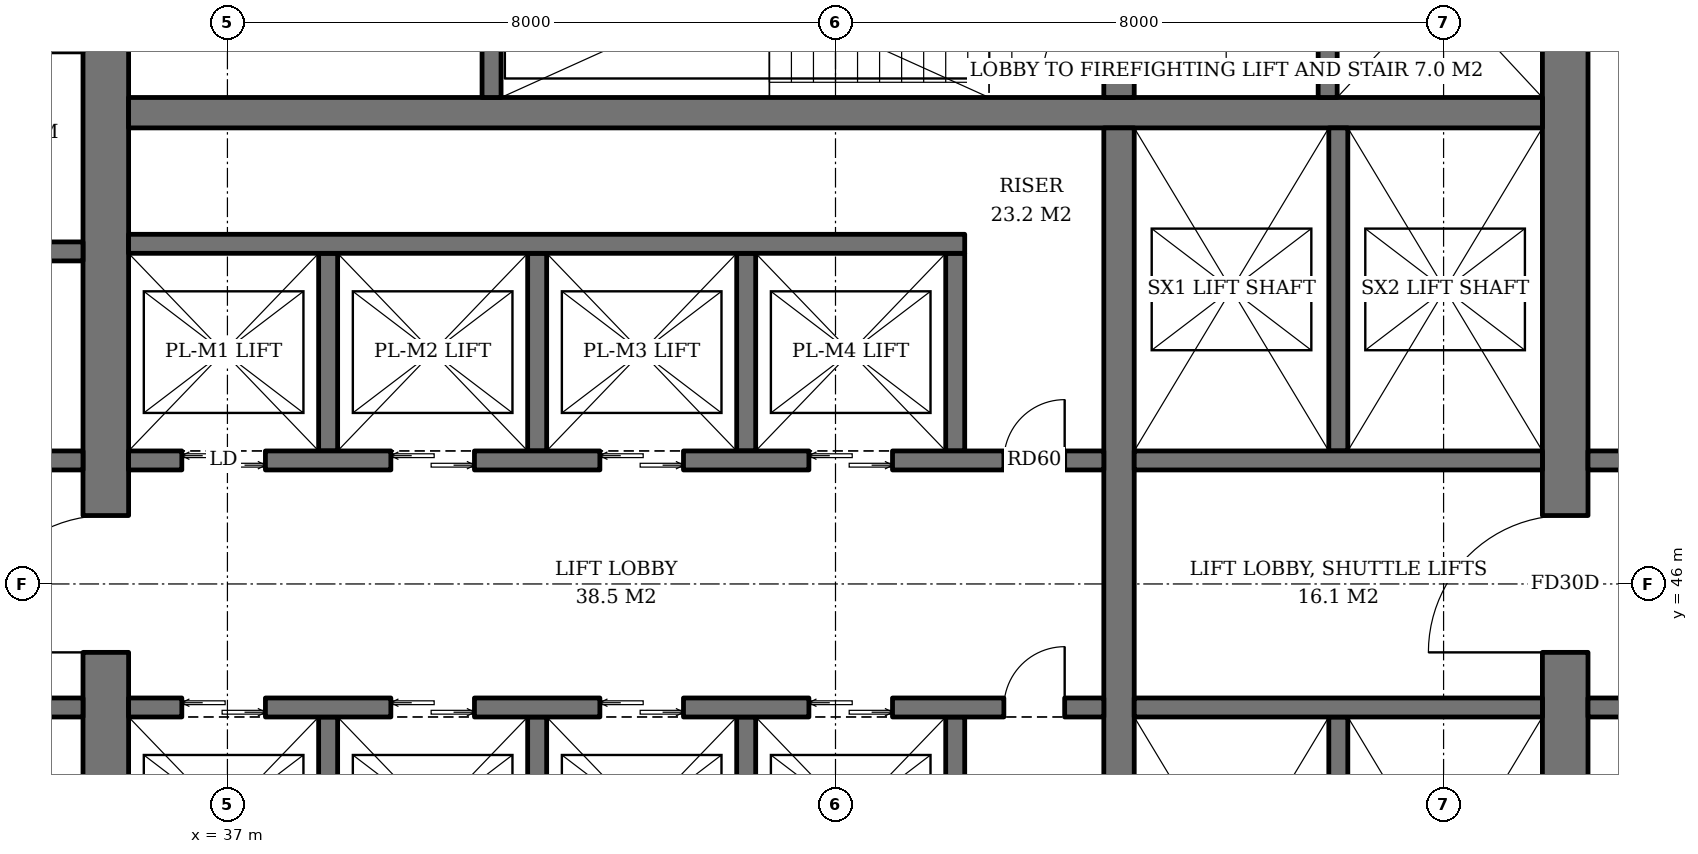
"""IFC4 building model, lengths in metres.
Left out: names, types, materials, properties, quantities, classifications, styles, units other than length and angle.
Written with IfcOpenShell. Run it as: python <this file> out.ifc"""

import sys

from ifc_helpers import new_model, si_unit, direction, frame, frame_2d, origin, place, context, subcontext, project, spatial, rectangle, extrude, element, fill, save


model = new_model("IFC4")
c1 = context("Model", 3, precision=1e-05, world=origin(), true_north=direction((0.0, 1.0)))
c2 = subcontext(c1, "Body", "Model", "MODEL_VIEW")
j1 = project(units=[si_unit("LENGTHUNIT", "METRE"), si_unit("PLANEANGLEUNIT", "RADIAN")], contexts=[c1])
p1 = place(None, origin())
s1 = spatial("IfcSite", under=j1, at=p1, CompositionType="ELEMENT")
p2 = place(p1, origin())
s2 = spatial("IfcBuilding", under=s1, at=p2, CompositionType="ELEMENT")
p3 = place(p2, frame((0.0, 0.0, 116.0)))
s3 = spatial("IfcBuildingStorey", under=s2, at=p3, CompositionType="ELEMENT", Elevation=116.0)
p4 = place(p3, frame((35.4, 36.7, 0.0), z_axis=(0.0, 0.0, 1.0), x_axis=(0.0, 1.0, 0.0)))
e1 = element("IfcWall", 1, at=p4, inside=s3, PredefinedType="SHEAR", context=c2, shape_type="SweptSolid", body=[
    extrude(rectangle(XDim=18.6, YDim=0.6, at=frame_2d((9.3, 0.0))), origin(), (0.0, 0.0, 1.0), 3.8),
])
p5 = place(p4, frame((8.4, 0.0, 0.0)))
e2 = element("IfcOpeningElement", 2, at=p5, cuts=e1, PredefinedType="OPENING", context=c2, shape_type="SweptSolid", body=[
    extrude(rectangle(XDim=1.8, YDim=2.4, at=frame_2d((0.9, 1.2))), frame((0.0, 0.31, 0.0), z_axis=(0.0, -1.0, 0.0), x_axis=(1.0, 0.0, 0.0)), (0.0, 0.0, 1.0), 0.62),
])
p6 = place(p3, frame((54.6, 36.7, 0.0), z_axis=(0.0, 0.0, 1.0), x_axis=(0.0, 1.0, 0.0)))
e3 = element("IfcWall", 3, at=p6, inside=s3, PredefinedType="SHEAR", context=c2, shape_type="SweptSolid", body=[
    extrude(rectangle(XDim=18.6, YDim=0.6, at=frame_2d((9.3, 0.0))), origin(), (0.0, 0.0, 1.0), 3.8),
])
p7 = place(p6, frame((8.4, 0.0, 0.0)))
e4 = element("IfcOpeningElement", 4, at=p7, cuts=e3, PredefinedType="OPENING", context=c2, shape_type="SweptSolid", body=[
    extrude(rectangle(XDim=1.8, YDim=2.4, at=frame_2d((0.9, 1.2))), frame((0.0, 0.31, 0.0), z_axis=(0.0, -1.0, 0.0), x_axis=(1.0, 0.0, 0.0)), (0.0, 0.0, 1.0), 0.62),
])
p8 = place(p3, frame((35.7, 52.2, 0.0), z_axis=(0.0, 0.0, 1.0), x_axis=(1.0, 0.0, 0.0)))
e5 = element("IfcWall", 5, at=p8, inside=s3, PredefinedType="SHEAR", context=c2, shape_type="SweptSolid", body=[
    extrude(rectangle(XDim=18.6, YDim=0.4, at=frame_2d((9.3, 0.0))), origin(), (0.0, 0.0, 1.0), 3.8),
])
p9 = place(p3, frame((48.73, 40.0, 0.0), z_axis=(0.0, 0.0, 1.0), x_axis=(0.0, 1.0, 0.0)))
e6 = element("IfcWall", 6, at=p9, inside=s3, PredefinedType="SHEAR", context=c2, shape_type="SweptSolid", body=[
    extrude(rectangle(XDim=12.0, YDim=0.4, at=frame_2d((6.0, 0.0))), origin(), (0.0, 0.0, 1.0), 3.8),
])
p10 = place(p3, frame((48.73, 52.4, 0.0), z_axis=(0.0, 0.0, 1.0), x_axis=(0.0, 1.0, 0.0)))
e7 = element("IfcWall", 7, at=p10, inside=s3, PredefinedType="SHEAR", context=c2, shape_type="SweptSolid", body=[
    extrude(rectangle(XDim=2.9, YDim=0.4, at=frame_2d((1.45, 0.0))), origin(), (0.0, 0.0, 1.0), 3.8),
])
p11 = place(p10, frame((0.3, 0.0, 0.0)))
e8 = element("IfcOpeningElement", 8, at=p11, cuts=e7, PredefinedType="OPENING", context=c2, shape_type="SweptSolid", body=[
    extrude(rectangle(XDim=1.0, YDim=2.1, at=frame_2d((0.5, 1.05))), frame((0.0, 0.21, 0.0), z_axis=(0.0, -1.0, 0.0), x_axis=(1.0, 0.0, 0.0)), (0.0, 0.0, 1.0), 0.42),
])
p12 = place(p3, frame((40.475, 52.4, 0.0), z_axis=(0.0, 0.0, 1.0), x_axis=(0.0, 1.0, 0.0)))
e9 = element("IfcWall", 9, at=p12, inside=s3, PredefinedType="SHEAR", context=c2, shape_type="SweptSolid", body=[
    extrude(rectangle(XDim=2.9, YDim=0.25, at=frame_2d((1.45, 0.0))), origin(), (0.0, 0.0, 1.0), 3.8),
])
p13 = place(p3, frame((51.475, 52.4, 0.0), z_axis=(0.0, 0.0, 1.0), x_axis=(0.0, 1.0, 0.0)))
e10 = element("IfcWall", 10, at=p13, inside=s3, PredefinedType="SHEAR", context=c2, shape_type="SweptSolid", body=[
    extrude(rectangle(XDim=2.9, YDim=0.25, at=frame_2d((1.45, 0.0))), origin(), (0.0, 0.0, 1.0), 3.8),
])
p14 = place(p13, frame((0.8, 0.0, 0.0)))
e11 = element("IfcOpeningElement", 11, at=p14, cuts=e10, PredefinedType="OPENING", context=c2, shape_type="SweptSolid", body=[
    extrude(rectangle(XDim=1.3, YDim=2.2, at=frame_2d((0.65, 1.1))), frame((0.0, 0.135, 0.0), z_axis=(0.0, -1.0, 0.0), x_axis=(1.0, 0.0, 0.0)), (0.0, 0.0, 1.0), 0.27),
])
for number, where, z_axis, x_axis in (
    (12, (38.325, 47.75, 0.0), (0.0, 0.0, 1.0), (0.0, 1.0, 0.0)),
    (13, (41.075, 47.75, 0.0), (0.0, 0.0, 1.0), (0.0, 1.0, 0.0)),
    (14, (43.825, 47.75, 0.0), (0.0, 0.0, 1.0), (0.0, 1.0, 0.0)),
    (15, (46.575, 47.75, 0.0), (0.0, 0.0, 1.0), (0.0, 1.0, 0.0)),
):
    element("IfcWall", number, at=place(p3, frame(where, z_axis=z_axis, x_axis=x_axis)), inside=s3, PredefinedType="SHEAR", context=c2, shape_type="SweptSolid", body=[
        extrude(rectangle(XDim=2.6, YDim=0.25, at=frame_2d((1.3, 0.0))), origin(), (0.0, 0.0, 1.0), 3.8),
    ])
p15 = place(p3, frame((35.7, 50.475, 0.0), z_axis=(0.0, 0.0, 1.0), x_axis=(1.0, 0.0, 0.0)))
e16 = element("IfcWall", 16, at=p15, inside=s3, PredefinedType="SHEAR", context=c2, shape_type="SweptSolid", body=[
    extrude(rectangle(XDim=11.0, YDim=0.25, at=frame_2d((5.5, 0.0))), origin(), (0.0, 0.0, 1.0), 3.8),
])
p16 = place(p3, frame((35.7, 47.625, 0.0), z_axis=(0.0, 0.0, 1.0), x_axis=(1.0, 0.0, 0.0)))
e17 = element("IfcWall", 17, at=p16, inside=s3, PredefinedType="SHEAR", context=c2, shape_type="SweptSolid", body=[
    extrude(rectangle(XDim=12.83, YDim=0.25, at=frame_2d((6.415, 0.0))), origin(), (0.0, 0.0, 1.0), 3.8),
])
p17 = place(p16, frame((0.7, 0.0, 0.0)))
e18 = element("IfcOpeningElement", 18, at=p17, cuts=e17, PredefinedType="OPENING", context=c2, shape_type="SweptSolid", body=[
    extrude(rectangle(XDim=1.1, YDim=2.2, at=frame_2d((0.55, 1.1))), frame((0.0, 0.135, 0.0), z_axis=(0.0, -1.0, 0.0), x_axis=(1.0, 0.0, 0.0)), (0.0, 0.0, 1.0), 0.27),
])
p18 = place(p16, frame((3.45, 0.0, 0.0)))
e19 = element("IfcOpeningElement", 19, at=p18, cuts=e17, PredefinedType="OPENING", context=c2, shape_type="SweptSolid", body=[
    extrude(rectangle(XDim=1.1, YDim=2.2, at=frame_2d((0.55, 1.1))), frame((0.0, 0.135, 0.0), z_axis=(0.0, -1.0, 0.0), x_axis=(1.0, 0.0, 0.0)), (0.0, 0.0, 1.0), 0.27),
])
p19 = place(p16, frame((6.2, 0.0, 0.0)))
e20 = element("IfcOpeningElement", 20, at=p19, cuts=e17, PredefinedType="OPENING", context=c2, shape_type="SweptSolid", body=[
    extrude(rectangle(XDim=1.1, YDim=2.2, at=frame_2d((0.55, 1.1))), frame((0.0, 0.135, 0.0), z_axis=(0.0, -1.0, 0.0), x_axis=(1.0, 0.0, 0.0)), (0.0, 0.0, 1.0), 0.27),
])
p20 = place(p16, frame((8.95, 0.0, 0.0)))
e21 = element("IfcOpeningElement", 21, at=p20, cuts=e17, PredefinedType="OPENING", context=c2, shape_type="SweptSolid", body=[
    extrude(rectangle(XDim=1.1, YDim=2.2, at=frame_2d((0.55, 1.1))), frame((0.0, 0.135, 0.0), z_axis=(0.0, -1.0, 0.0), x_axis=(1.0, 0.0, 0.0)), (0.0, 0.0, 1.0), 0.27),
])
p21 = place(p16, frame((11.515, 0.0, 0.0)))
e22 = element("IfcOpeningElement", 22, at=p21, cuts=e17, PredefinedType="OPENING", context=c2, shape_type="SweptSolid", body=[
    extrude(rectangle(XDim=0.8, YDim=2.0, at=frame_2d((0.4, 1.0))), frame((0.0, 0.135, 0.0), z_axis=(0.0, -1.0, 0.0), x_axis=(1.0, 0.0, 0.0)), (0.0, 0.0, 1.0), 0.27),
])
for number, where, z_axis, x_axis in (
    (23, (38.325, 44.25, 0.0), (0.0, 0.0, 1.0), (0.0, -1.0, 0.0)),
    (24, (41.075, 44.25, 0.0), (0.0, 0.0, 1.0), (0.0, -1.0, 0.0)),
    (25, (43.825, 44.25, 0.0), (0.0, 0.0, 1.0), (0.0, -1.0, 0.0)),
    (26, (46.575, 44.25, 0.0), (0.0, 0.0, 1.0), (0.0, -1.0, 0.0)),
):
    element("IfcWall", number, at=place(p3, frame(where, z_axis=z_axis, x_axis=x_axis)), inside=s3, PredefinedType="SHEAR", context=c2, shape_type="SweptSolid", body=[
        extrude(rectangle(XDim=2.6, YDim=0.25, at=frame_2d((1.3, 0.0))), origin(), (0.0, 0.0, 1.0), 3.8),
    ])
p22 = place(p3, frame((35.7, 44.375, 0.0), z_axis=(0.0, 0.0, 1.0), x_axis=(1.0, 0.0, 0.0)))
e27 = element("IfcWall", 27, at=p22, inside=s3, PredefinedType="SHEAR", context=c2, shape_type="SweptSolid", body=[
    extrude(rectangle(XDim=12.83, YDim=0.25, at=frame_2d((6.415, 0.0))), origin(), (0.0, 0.0, 1.0), 3.8),
])
p23 = place(p22, frame((0.7, 0.0, 0.0)))
e28 = element("IfcOpeningElement", 28, at=p23, cuts=e27, PredefinedType="OPENING", context=c2, shape_type="SweptSolid", body=[
    extrude(rectangle(XDim=1.1, YDim=2.2, at=frame_2d((0.55, 1.1))), frame((0.0, 0.135, 0.0), z_axis=(0.0, -1.0, 0.0), x_axis=(1.0, 0.0, 0.0)), (0.0, 0.0, 1.0), 0.27),
])
p24 = place(p22, frame((3.45, 0.0, 0.0)))
e29 = element("IfcOpeningElement", 29, at=p24, cuts=e27, PredefinedType="OPENING", context=c2, shape_type="SweptSolid", body=[
    extrude(rectangle(XDim=1.1, YDim=2.2, at=frame_2d((0.55, 1.1))), frame((0.0, 0.135, 0.0), z_axis=(0.0, -1.0, 0.0), x_axis=(1.0, 0.0, 0.0)), (0.0, 0.0, 1.0), 0.27),
])
p25 = place(p22, frame((6.2, 0.0, 0.0)))
e30 = element("IfcOpeningElement", 30, at=p25, cuts=e27, PredefinedType="OPENING", context=c2, shape_type="SweptSolid", body=[
    extrude(rectangle(XDim=1.1, YDim=2.2, at=frame_2d((0.55, 1.1))), frame((0.0, 0.135, 0.0), z_axis=(0.0, -1.0, 0.0), x_axis=(1.0, 0.0, 0.0)), (0.0, 0.0, 1.0), 0.27),
])
p26 = place(p22, frame((8.95, 0.0, 0.0)))
e31 = element("IfcOpeningElement", 31, at=p26, cuts=e27, PredefinedType="OPENING", context=c2, shape_type="SweptSolid", body=[
    extrude(rectangle(XDim=1.1, YDim=2.2, at=frame_2d((0.55, 1.1))), frame((0.0, 0.135, 0.0), z_axis=(0.0, -1.0, 0.0), x_axis=(1.0, 0.0, 0.0)), (0.0, 0.0, 1.0), 0.27),
])
p27 = place(p22, frame((11.515, 0.0, 0.0)))
e32 = element("IfcOpeningElement", 32, at=p27, cuts=e27, PredefinedType="OPENING", context=c2, shape_type="SweptSolid", body=[
    extrude(rectangle(XDim=0.8, YDim=2.0, at=frame_2d((0.4, 1.0))), frame((0.0, 0.135, 0.0), z_axis=(0.0, -1.0, 0.0), x_axis=(1.0, 0.0, 0.0)), (0.0, 0.0, 1.0), 0.27),
])
p28 = place(p3, frame((51.615, 47.75, 0.0), z_axis=(0.0, 0.0, 1.0), x_axis=(0.0, 1.0, 0.0)))
e33 = element("IfcWall", 33, at=p28, inside=s3, PredefinedType="SHEAR", context=c2, shape_type="SweptSolid", body=[
    extrude(rectangle(XDim=4.25, YDim=0.25, at=frame_2d((2.125, 0.0))), origin(), (0.0, 0.0, 1.0), 3.8),
])
p29 = place(p3, frame((48.93, 47.625, 0.0), z_axis=(0.0, 0.0, 1.0), x_axis=(1.0, 0.0, 0.0)))
e34 = element("IfcWall", 34, at=p29, inside=s3, PredefinedType="SHEAR", context=c2, shape_type="SweptSolid", body=[
    extrude(rectangle(XDim=5.37, YDim=0.25, at=frame_2d((2.685, 0.0))), origin(), (0.0, 0.0, 1.0), 3.8),
])
p30 = place(p3, frame((51.615, 44.25, 0.0), z_axis=(0.0, 0.0, 1.0), x_axis=(0.0, -1.0, 0.0)))
e35 = element("IfcWall", 35, at=p30, inside=s3, PredefinedType="SHEAR", context=c2, shape_type="SweptSolid", body=[
    extrude(rectangle(XDim=4.25, YDim=0.25, at=frame_2d((2.125, 0.0))), origin(), (0.0, 0.0, 1.0), 3.8),
])
p31 = place(p3, frame((48.93, 44.375, 0.0), z_axis=(0.0, 0.0, 1.0), x_axis=(1.0, 0.0, 0.0)))
e36 = element("IfcWall", 36, at=p31, inside=s3, PredefinedType="SHEAR", context=c2, shape_type="SweptSolid", body=[
    extrude(rectangle(XDim=5.37, YDim=0.25, at=frame_2d((2.685, 0.0))), origin(), (0.0, 0.0, 1.0), 3.8),
])
for number, where, z_axis, x_axis in (
    (37, (32.4, 44.375, 0.0), (0.0, 0.0, 1.0), (1.0, 0.0, 0.0)),
    (38, (32.4, 47.625, 0.0), (0.0, 0.0, 1.0), (1.0, 0.0, 0.0)),
    (39, (32.4, 50.375, 0.0), (0.0, 0.0, 1.0), (1.0, 0.0, 0.0)),
):
    element("IfcWall", number, at=place(p3, frame(where, z_axis=z_axis, x_axis=x_axis)), inside=s3, PredefinedType="SHEAR", context=c2, shape_type="SweptSolid", body=[
        extrude(rectangle(XDim=2.7, YDim=0.25, at=frame_2d((1.35, 0.0))), origin(), (0.0, 0.0, 1.0), 3.8),
    ])
for number, where, z_axis, x_axis in (
    (40, (54.9, 44.375, 0.0), (0.0, 0.0, 1.0), (1.0, 0.0, 0.0)),
    (41, (54.9, 47.625, 0.0), (0.0, 0.0, 1.0), (1.0, 0.0, 0.0)),
):
    element("IfcWall", number, at=place(p3, frame(where, z_axis=z_axis, x_axis=x_axis)), inside=s3, PredefinedType="SOLIDWALL", context=c2, shape_type="SweptSolid", body=[
        extrude(rectangle(XDim=2.7, YDim=0.25, at=frame_2d((1.35, 0.0))), origin(), (0.0, 0.0, 1.0), 3.62),
    ])
p32 = place(p17, origin())
e42 = element("IfcDoor", 42, at=p32, inside=s3, OperationType="DOUBLE_DOOR_SLIDING", PredefinedType="DOOR", context=c2, shape_type="SweptSolid", body=[
    extrude(rectangle(XDim=1.1, YDim=2.2, at=frame_2d((0.55, 1.1))), frame((0.0, 0.025, 0.0), z_axis=(0.0, -1.0, 0.0), x_axis=(1.0, 0.0, 0.0)), (0.0, 0.0, 1.0), 0.05),
])
fill(e18, e42)
p33 = place(p18, origin())
e43 = element("IfcDoor", 43, at=p33, inside=s3, OperationType="DOUBLE_DOOR_SLIDING", PredefinedType="DOOR", context=c2, shape_type="SweptSolid", body=[
    extrude(rectangle(XDim=1.1, YDim=2.2, at=frame_2d((0.55, 1.1))), frame((0.0, 0.025, 0.0), z_axis=(0.0, -1.0, 0.0), x_axis=(1.0, 0.0, 0.0)), (0.0, 0.0, 1.0), 0.05),
])
fill(e19, e43)
p34 = place(p19, origin())
e44 = element("IfcDoor", 44, at=p34, inside=s3, OperationType="DOUBLE_DOOR_SLIDING", PredefinedType="DOOR", context=c2, shape_type="SweptSolid", body=[
    extrude(rectangle(XDim=1.1, YDim=2.2, at=frame_2d((0.55, 1.1))), frame((0.0, 0.025, 0.0), z_axis=(0.0, -1.0, 0.0), x_axis=(1.0, 0.0, 0.0)), (0.0, 0.0, 1.0), 0.05),
])
fill(e20, e44)
p35 = place(p20, origin())
e45 = element("IfcDoor", 45, at=p35, inside=s3, OperationType="DOUBLE_DOOR_SLIDING", PredefinedType="DOOR", context=c2, shape_type="SweptSolid", body=[
    extrude(rectangle(XDim=1.1, YDim=2.2, at=frame_2d((0.55, 1.1))), frame((0.0, 0.025, 0.0), z_axis=(0.0, -1.0, 0.0), x_axis=(1.0, 0.0, 0.0)), (0.0, 0.0, 1.0), 0.05),
])
fill(e21, e45)
p36 = place(p21, origin())
e46 = element("IfcDoor", 46, at=p36, inside=s3, OperationType="SINGLE_SWING_RIGHT", PredefinedType="DOOR", context=c2, shape_type="SweptSolid", body=[
    extrude(rectangle(XDim=0.8, YDim=2.0, at=frame_2d((0.4, 1.0))), frame((0.0, 0.025, 0.0), z_axis=(0.0, -1.0, 0.0), x_axis=(1.0, 0.0, 0.0)), (0.0, 0.0, 1.0), 0.05),
])
fill(e22, e46)
p37 = place(p23, origin())
e47 = element("IfcDoor", 47, at=p37, inside=s3, OperationType="DOUBLE_DOOR_SLIDING", PredefinedType="DOOR", context=c2, shape_type="SweptSolid", body=[
    extrude(rectangle(XDim=1.1, YDim=2.2, at=frame_2d((0.55, 1.1))), frame((0.0, 0.025, 0.0), z_axis=(0.0, -1.0, 0.0), x_axis=(1.0, 0.0, 0.0)), (0.0, 0.0, 1.0), 0.05),
])
fill(e28, e47)
p38 = place(p24, origin())
e48 = element("IfcDoor", 48, at=p38, inside=s3, OperationType="DOUBLE_DOOR_SLIDING", PredefinedType="DOOR", context=c2, shape_type="SweptSolid", body=[
    extrude(rectangle(XDim=1.1, YDim=2.2, at=frame_2d((0.55, 1.1))), frame((0.0, 0.025, 0.0), z_axis=(0.0, -1.0, 0.0), x_axis=(1.0, 0.0, 0.0)), (0.0, 0.0, 1.0), 0.05),
])
fill(e29, e48)
p39 = place(p25, origin())
e49 = element("IfcDoor", 49, at=p39, inside=s3, OperationType="DOUBLE_DOOR_SLIDING", PredefinedType="DOOR", context=c2, shape_type="SweptSolid", body=[
    extrude(rectangle(XDim=1.1, YDim=2.2, at=frame_2d((0.55, 1.1))), frame((0.0, 0.025, 0.0), z_axis=(0.0, -1.0, 0.0), x_axis=(1.0, 0.0, 0.0)), (0.0, 0.0, 1.0), 0.05),
])
fill(e30, e49)
p40 = place(p26, origin())
e50 = element("IfcDoor", 50, at=p40, inside=s3, OperationType="DOUBLE_DOOR_SLIDING", PredefinedType="DOOR", context=c2, shape_type="SweptSolid", body=[
    extrude(rectangle(XDim=1.1, YDim=2.2, at=frame_2d((0.55, 1.1))), frame((0.0, 0.025, 0.0), z_axis=(0.0, -1.0, 0.0), x_axis=(1.0, 0.0, 0.0)), (0.0, 0.0, 1.0), 0.05),
])
fill(e31, e50)
p41 = place(p27, origin())
e51 = element("IfcDoor", 51, at=p41, inside=s3, OperationType="SINGLE_SWING_RIGHT", PredefinedType="DOOR", context=c2, shape_type="SweptSolid", body=[
    extrude(rectangle(XDim=0.8, YDim=2.0, at=frame_2d((0.4, 1.0))), frame((0.0, 0.025, 0.0), z_axis=(0.0, -1.0, 0.0), x_axis=(1.0, 0.0, 0.0)), (0.0, 0.0, 1.0), 0.05),
])
fill(e32, e51)
p42 = place(p11, origin())
e52 = element("IfcDoor", 52, at=p42, inside=s3, OperationType="SINGLE_SWING_LEFT", PredefinedType="DOOR", context=c2, shape_type="SweptSolid", body=[
    extrude(rectangle(XDim=1.0, YDim=2.1, at=frame_2d((0.5, 1.05))), frame((0.0, 0.025, 0.0), z_axis=(0.0, -1.0, 0.0), x_axis=(1.0, 0.0, 0.0)), (0.0, 0.0, 1.0), 0.05),
])
fill(e8, e52)
p43 = place(p5, origin())
e53 = element("IfcDoor", 53, at=p43, inside=s3, OperationType="DOUBLE_DOOR_SINGLE_SWING", PredefinedType="DOOR", context=c2, shape_type="SweptSolid", body=[
    extrude(rectangle(XDim=1.8, YDim=2.4, at=frame_2d((0.9, 1.2))), frame((0.0, 0.025, 0.0), z_axis=(0.0, -1.0, 0.0), x_axis=(1.0, 0.0, 0.0)), (0.0, 0.0, 1.0), 0.05),
])
fill(e2, e53)
p44 = place(p7, origin())
e54 = element("IfcDoor", 54, at=p44, inside=s3, OperationType="DOUBLE_DOOR_SINGLE_SWING", PredefinedType="DOOR", context=c2, shape_type="SweptSolid", body=[
    extrude(rectangle(XDim=1.8, YDim=2.4, at=frame_2d((0.9, 1.2))), frame((0.0, 0.025, 0.0), z_axis=(0.0, -1.0, 0.0), x_axis=(1.0, 0.0, 0.0)), (0.0, 0.0, 1.0), 0.05),
])
fill(e4, e54)
save(model, sys.argv[1])
